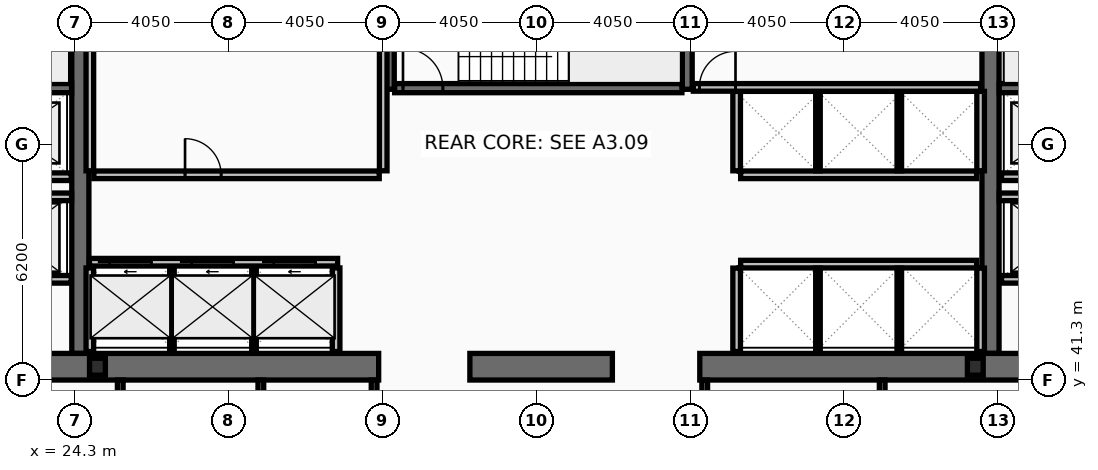
"""IFC4 building model, lengths in metres.
Left out: names, types, materials, properties, quantities, classifications, styles, units other than length and angle.
Written with IfcOpenShell. Run it as: python <this file> out.ifc"""

import sys

from ifc_helpers import new_model, si_unit, direction, frame, frame_2d, origin, origin_2d, place, context, subcontext, project, spatial, rectangle, i_section, extrude, element, fill, save


model = new_model("IFC4")
c1 = context("Model", 3, precision=1e-05, world=origin(), true_north=direction((0.0, 1.0)))
c2 = subcontext(c1, "Body", "Model", "MODEL_VIEW")
j1 = project(units=[si_unit("LENGTHUNIT", "METRE"), si_unit("PLANEANGLEUNIT", "RADIAN")], contexts=[c1])
p1 = place(None, origin())
s1 = spatial("IfcSite", under=j1, at=p1, CompositionType="ELEMENT")
p2 = place(p1, origin())
s2 = spatial("IfcBuilding", under=s1, at=p2, CompositionType="ELEMENT")
p3 = place(p2, frame((0.0, 0.0, 121.8)))
s3 = spatial("IfcBuildingStorey", under=s2, at=p3, CompositionType="ELEMENT", Elevation=121.8)
for number, where, z_axis, x_axis in (
    (1, (24.45, 42.0, 0.0), (0.0, 0.0, 1.0), (0.0, 1.0, 0.0)),
    (2, (48.4, 42.0, 0.0), (0.0, 0.0, 1.0), (0.0, 1.0, 0.0)),
):
    element("IfcWall", number, at=place(p3, frame(where, z_axis=z_axis, x_axis=x_axis)), inside=s3, PredefinedType="SHEAR", context=c2, shape_type="SweptSolid", body=[
        extrude(rectangle(XDim=11.0, YDim=0.45, at=frame_2d((5.5, 0.0))), origin(), (0.0, 0.0, 1.0), 3.44),
    ])
p4 = place(p3, frame((32.3, 41.65, 0.0), z_axis=(0.0, 0.0, 1.0), x_axis=(-1.0, 0.0, 0.0)))
e3 = element("IfcWall", 3, at=p4, inside=s3, PredefinedType="SHEAR", context=c2, shape_type="SweptSolid", body=[
    extrude(rectangle(XDim=11.45, YDim=0.7, at=frame_2d((5.725, 0.0))), origin(), (0.0, 0.0, 1.0), 3.44),
])
p5 = place(p3, frame((38.45, 41.65, 0.0), z_axis=(0.0, 0.0, 1.0), x_axis=(-1.0, 0.0, 0.0)))
e4 = element("IfcWall", 4, at=p5, inside=s3, PredefinedType="SHEAR", context=c2, shape_type="SweptSolid", body=[
    extrude(rectangle(XDim=3.75, YDim=0.7, at=frame_2d((1.875, 0.0))), origin(), (0.0, 0.0, 1.0), 3.44),
])
p6 = place(p3, frame((52.05, 41.65, 0.0), z_axis=(0.0, 0.0, 1.0), x_axis=(-1.0, 0.0, 0.0)))
e5 = element("IfcWall", 5, at=p6, inside=s3, PredefinedType="SHEAR", context=c2, shape_type="SweptSolid", body=[
    extrude(rectangle(XDim=11.3, YDim=0.7, at=frame_2d((5.65, 0.0))), origin(), (0.0, 0.0, 1.0), 3.44),
])
for number, where, z_axis, x_axis in (
    (6, (32.58, 48.95, 0.0), (0.0, 0.0, 1.0), (0.0, 1.0, 0.0)),
    (7, (40.42, 48.95, 0.0), (0.0, 0.0, 1.0), (0.0, 1.0, 0.0)),
):
    element("IfcWall", number, at=place(p3, frame(where, z_axis=z_axis, x_axis=x_axis)), inside=s3, PredefinedType="SHEAR", context=c2, shape_type="SweptSolid", body=[
        extrude(rectangle(XDim=4.05, YDim=0.26, at=frame_2d((2.025, 0.0))), origin(), (0.0, 0.0, 1.0), 3.44),
    ])
p7 = place(p3, frame((16.9, 48.98, 0.0), z_axis=(0.0, 0.0, 1.0), x_axis=(1.0, 0.0, 0.0)))
e8 = element("IfcWall", 8, at=p7, inside=s3, PredefinedType="SHEAR", context=c2, shape_type="SweptSolid", body=[
    extrude(rectangle(XDim=7.32, YDim=0.24, at=frame_2d((3.66, 0.0))), origin(), (0.0, 0.0, 1.0), 3.44),
])
p8 = place(p7, frame((0.22, 0.0, 0.0)))
e9 = element("IfcOpeningElement", 9, at=p8, cuts=e8, PredefinedType="OPENING", context=c2, shape_type="SweptSolid", body=[
    extrude(rectangle(XDim=1.05, YDim=2.15, at=frame_2d((0.525, 1.075))), frame((0.0, 0.13, 0.0), z_axis=(0.0, -1.0, 0.0), x_axis=(1.0, 0.0, 0.0)), (0.0, 0.0, 1.0), 0.26),
])
p9 = place(p3, frame((48.63, 48.98, 0.0), z_axis=(0.0, 0.0, 1.0), x_axis=(1.0, 0.0, 0.0)))
e10 = element("IfcWall", 10, at=p9, inside=s3, PredefinedType="SHEAR", context=c2, shape_type="SweptSolid", body=[
    extrude(rectangle(XDim=7.37, YDim=0.24, at=frame_2d((3.685, 0.0))), origin(), (0.0, 0.0, 1.0), 3.44),
])
p10 = place(p9, frame((6.1, 0.0, 0.0)))
e11 = element("IfcOpeningElement", 11, at=p10, cuts=e10, PredefinedType="OPENING", context=c2, shape_type="SweptSolid", body=[
    extrude(rectangle(XDim=1.05, YDim=2.15, at=frame_2d((0.525, 1.075))), frame((0.0, 0.13, 0.0), z_axis=(0.0, -1.0, 0.0), x_axis=(1.0, 0.0, 0.0)), (0.0, 0.0, 1.0), 0.26),
])
p11 = place(p3, frame((32.72, 48.98, 0.0), z_axis=(0.0, 0.0, 1.0), x_axis=(1.0, 0.0, 0.0)))
e12 = element("IfcWall", 12, at=p11, inside=s3, PredefinedType="SHEAR", context=c2, shape_type="SweptSolid", body=[
    extrude(rectangle(XDim=7.56, YDim=0.24, at=frame_2d((3.78, 0.0))), origin(), (0.0, 0.0, 1.0), 3.44),
])
p12 = place(p11, frame((0.22, 0.0, 0.0)))
e13 = element("IfcOpeningElement", 13, at=p12, cuts=e12, PredefinedType="OPENING", context=c2, shape_type="SweptSolid", body=[
    extrude(rectangle(XDim=1.05, YDim=2.15, at=frame_2d((0.525, 1.075))), frame((0.0, 0.13, 0.0), z_axis=(0.0, -1.0, 0.0), x_axis=(1.0, 0.0, 0.0)), (0.0, 0.0, 1.0), 0.26),
])
for number, where, z_axis, x_axis in (
    (14, (24.9, 41.65, 0.0), (0.0, 0.0, 1.0), (1.0, 0.0, 0.0)),
    (15, (48.0, 41.65, 0.0), (0.0, 0.0, 1.0), (1.0, 0.0, 0.0)),
):
    element("IfcColumn", number, at=place(p3, frame(where, z_axis=z_axis, x_axis=x_axis)), inside=s3, PredefinedType="COLUMN", context=c2, shape_type="SweptSolid", body=[
        extrude(i_section(OverallWidth=0.416, OverallDepth=0.446, WebThickness=0.039, FlangeThickness=0.063, at=origin_2d()), origin(), (0.0, 0.0, 1.0), 3.6),
    ])
p13 = place(p3, frame((24.69, 44.4, 0.0), z_axis=(0.0, 0.0, 1.0), x_axis=(1.0, 0.0, 0.0)))
e16 = element("IfcWall", 16, at=p13, inside=s3, PredefinedType="PARTITIONING", context=c2, shape_type="SweptSolid", body=[
    extrude(rectangle(XDim=6.53, YDim=0.2, at=frame_2d((3.265, 0.0))), origin(), (0.0, 0.0, 1.0), 3.44),
])
p14 = place(p13, frame((0.53, 0.0, 0.0)))
e17 = element("IfcOpeningElement", 17, at=p14, cuts=e16, PredefinedType="OPENING", context=c2, shape_type="SweptSolid", body=[
    extrude(rectangle(XDim=1.1, YDim=2.18, at=frame_2d((0.55, 1.09))), frame((0.0, 0.11, 0.0), z_axis=(0.0, -1.0, 0.0), x_axis=(1.0, 0.0, 0.0)), (0.0, 0.0, 1.0), 0.22),
])
p15 = place(p13, frame((2.69, 0.0, 0.0)))
e18 = element("IfcOpeningElement", 18, at=p15, cuts=e16, PredefinedType="OPENING", context=c2, shape_type="SweptSolid", body=[
    extrude(rectangle(XDim=1.1, YDim=2.18, at=frame_2d((0.55, 1.09))), frame((0.0, 0.11, 0.0), z_axis=(0.0, -1.0, 0.0), x_axis=(1.0, 0.0, 0.0)), (0.0, 0.0, 1.0), 0.22),
])
p16 = place(p13, frame((4.85, 0.0, 0.0)))
e19 = element("IfcOpeningElement", 19, at=p16, cuts=e16, PredefinedType="OPENING", context=c2, shape_type="SweptSolid", body=[
    extrude(rectangle(XDim=1.1, YDim=2.18, at=frame_2d((0.55, 1.09))), frame((0.0, 0.11, 0.0), z_axis=(0.0, -1.0, 0.0), x_axis=(1.0, 0.0, 0.0)), (0.0, 0.0, 1.0), 0.22),
])
p17 = place(p3, frame((51.61, 43.95, 0.0), z_axis=(0.0, 0.0, 1.0), x_axis=(-1.0, 0.0, 0.0)))
e20 = element("IfcWall", 20, at=p17, inside=s3, PredefinedType="PARTITIONING", context=c2, shape_type="SweptSolid", body=[
    extrude(rectangle(XDim=2.92, YDim=0.2, at=frame_2d((1.46, 0.0))), origin(), (0.0, 0.0, 1.0), 3.44),
])
p18 = place(p17, frame((0.81, 0.0, 0.0)))
e21 = element("IfcOpeningElement", 21, at=p18, cuts=e20, PredefinedType="OPENING", context=c2, shape_type="SweptSolid", body=[
    extrude(rectangle(XDim=1.3, YDim=2.18, at=frame_2d((0.65, 1.09))), frame((0.0, 0.11, 0.0), z_axis=(0.0, -1.0, 0.0), x_axis=(1.0, 0.0, 0.0)), (0.0, 0.0, 1.0), 0.22),
])
p19 = place(p3, frame((24.21, 43.95, 0.0), z_axis=(0.0, 0.0, 1.0), x_axis=(-1.0, 0.0, 0.0)))
e22 = element("IfcWall", 22, at=p19, inside=s3, PredefinedType="PARTITIONING", context=c2, shape_type="SweptSolid", body=[
    extrude(rectangle(XDim=2.97, YDim=0.2, at=frame_2d((1.485, 0.0))), origin(), (0.0, 0.0, 1.0), 3.44),
])
p20 = place(p19, frame((0.86, 0.0, 0.0)))
e23 = element("IfcOpeningElement", 23, at=p20, cuts=e22, PredefinedType="OPENING", context=c2, shape_type="SweptSolid", body=[
    extrude(rectangle(XDim=1.3, YDim=2.18, at=frame_2d((0.65, 1.09))), frame((0.0, 0.11, 0.0), z_axis=(0.0, -1.0, 0.0), x_axis=(1.0, 0.0, 0.0)), (0.0, 0.0, 1.0), 0.22),
])
p21 = place(p3, frame((51.61, 46.65, 0.0), z_axis=(0.0, 0.0, 1.0), x_axis=(-1.0, 0.0, 0.0)))
e24 = element("IfcWall", 24, at=p21, inside=s3, PredefinedType="PARTITIONING", context=c2, shape_type="SweptSolid", body=[
    extrude(rectangle(XDim=2.92, YDim=0.2, at=frame_2d((1.46, 0.0))), origin(), (0.0, 0.0, 1.0), 3.44),
])
p22 = place(p21, frame((0.86, 0.0, 0.0)))
e25 = element("IfcOpeningElement", 25, at=p22, cuts=e24, PredefinedType="OPENING", context=c2, shape_type="SweptSolid", body=[
    extrude(rectangle(XDim=1.2, YDim=2.18, at=frame_2d((0.6, 1.09))), frame((0.0, 0.11, 0.0), z_axis=(0.0, -1.0, 0.0), x_axis=(1.0, 0.0, 0.0)), (0.0, 0.0, 1.0), 0.22),
])
p23 = place(p3, frame((24.21, 46.65, 0.0), z_axis=(0.0, 0.0, 1.0), x_axis=(-1.0, 0.0, 0.0)))
e26 = element("IfcWall", 26, at=p23, inside=s3, PredefinedType="PARTITIONING", context=c2, shape_type="SweptSolid", body=[
    extrude(rectangle(XDim=2.97, YDim=0.2, at=frame_2d((1.485, 0.0))), origin(), (0.0, 0.0, 1.0), 3.44),
])
p24 = place(p23, frame((0.91, 0.0, 0.0)))
e27 = element("IfcOpeningElement", 27, at=p24, cuts=e26, PredefinedType="OPENING", context=c2, shape_type="SweptSolid", body=[
    extrude(rectangle(XDim=1.2, YDim=2.18, at=frame_2d((0.6, 1.09))), frame((0.0, 0.11, 0.0), z_axis=(0.0, -1.0, 0.0), x_axis=(1.0, 0.0, 0.0)), (0.0, 0.0, 1.0), 0.22),
])
p25 = place(p3, frame((21.2, 46.12, 0.0), z_axis=(0.0, 0.0, 1.0), x_axis=(1.0, 0.0, 0.0)))
e28 = element("IfcWall", 28, at=p25, inside=s3, PredefinedType="PARTITIONING", context=c2, shape_type="SweptSolid", body=[
    extrude(rectangle(XDim=3.02, YDim=0.2, at=frame_2d((1.51, 0.0))), origin(), (0.0, 0.0, 1.0), 3.44),
])
p26 = place(p3, frame((48.63, 46.12, 0.0), z_axis=(0.0, 0.0, 1.0), x_axis=(1.0, 0.0, 0.0)))
e29 = element("IfcWall", 29, at=p26, inside=s3, PredefinedType="PARTITIONING", context=c2, shape_type="SweptSolid", body=[
    extrude(rectangle(XDim=3.07, YDim=0.2, at=frame_2d((1.535, 0.0))), origin(), (0.0, 0.0, 1.0), 3.44),
])
for number, where, z_axis, x_axis in (
    (30, (24.7, 46.805, 0.0), (0.0, 0.0, 1.0), (0.0, 1.0, 0.0)),
    (31, (32.42, 46.805, 0.0), (0.0, 0.0, 1.0), (0.0, 1.0, 0.0)),
):
    element("IfcWall", number, at=place(p3, frame(where, z_axis=z_axis, x_axis=x_axis)), inside=s3, PredefinedType="PARTITIONING", context=c2, shape_type="SweptSolid", body=[
        extrude(rectangle(XDim=5.99, YDim=0.2, at=frame_2d((2.995, 0.0))), origin(), (0.0, 0.0, 1.0), 3.44),
    ])
p27 = place(p3, frame((24.805, 46.7, 0.0), z_axis=(0.0, 0.0, 1.0), x_axis=(1.0, 0.0, 0.0)))
e32 = element("IfcWall", 32, at=p27, inside=s3, PredefinedType="PARTITIONING", context=c2, shape_type="SweptSolid", body=[
    extrude(rectangle(XDim=7.51, YDim=0.2, at=frame_2d((3.755, 0.0))), origin(), (0.0, 0.0, 1.0), 3.44),
])
p28 = place(p27, frame((2.4, 0.0, 0.0)))
e33 = element("IfcOpeningElement", 33, at=p28, cuts=e32, PredefinedType="OPENING", context=c2, shape_type="SweptSolid", body=[
    extrude(rectangle(XDim=0.95, YDim=2.1, at=frame_2d((0.475, 1.05))), frame((0.0, 0.11, 0.0), z_axis=(0.0, -1.0, 0.0), x_axis=(1.0, 0.0, 0.0)), (0.0, 0.0, 1.0), 0.22),
])
for number, where, z_axis, x_axis in (
    (34, (24.7, 42.05, 0.0), (0.0, 0.0, 1.0), (0.0, 1.0, 0.0)),
    (35, (31.18, 42.05, 0.0), (0.0, 0.0, 1.0), (0.0, 1.0, 0.0)),
):
    element("IfcWall", number, at=place(p3, frame(where, z_axis=z_axis, x_axis=x_axis)), inside=s3, PredefinedType="PARTITIONING", context=c2, shape_type="SweptSolid", body=[
        extrude(rectangle(XDim=2.2, YDim=0.2, at=frame_2d((1.1, 0.0))), origin(), (0.0, 0.0, 1.0), 3.44),
    ])
for number, where, z_axis, x_axis in (
    (36, (26.86, 42.05, 0.0), (0.0, 0.0, 1.0), (0.0, 1.0, 0.0)),
    (37, (29.02, 42.05, 0.0), (0.0, 0.0, 1.0), (0.0, 1.0, 0.0)),
):
    element("IfcWall", number, at=place(p3, frame(where, z_axis=z_axis, x_axis=x_axis)), inside=s3, PredefinedType="PARTITIONING", context=c2, shape_type="SweptSolid", body=[
        extrude(rectangle(XDim=2.2, YDim=0.12, at=frame_2d((1.1, 0.0))), origin(), (0.0, 0.0, 1.0), 3.44),
    ])
p29 = place(p3, frame((41.825, 46.7, 0.0), z_axis=(0.0, 0.0, 1.0), x_axis=(1.0, 0.0, 0.0)))
e38 = element("IfcWall", 38, at=p29, inside=s3, PredefinedType="PARTITIONING", context=c2, shape_type="SweptSolid", body=[
    extrude(rectangle(XDim=6.21, YDim=0.2, at=frame_2d((3.105, 0.0))), origin(), (0.0, 0.0, 1.0), 3.44),
])
for number, where, z_axis, x_axis in (
    (39, (41.72, 46.805, 0.0), (0.0, 0.0, 1.0), (0.0, 1.0, 0.0)),
    (40, (48.14, 46.805, 0.0), (0.0, 0.0, 1.0), (0.0, 1.0, 0.0)),
):
    element("IfcWall", number, at=place(p3, frame(where, z_axis=z_axis, x_axis=x_axis)), inside=s3, PredefinedType="PARTITIONING", context=c2, shape_type="SweptSolid", body=[
        extrude(rectangle(XDim=2.09, YDim=0.2, at=frame_2d((1.045, 0.0))), origin(), (0.0, 0.0, 1.0), 3.44),
    ])
for number, where, z_axis, x_axis in (
    (41, (43.86, 46.805, 0.0), (0.0, 0.0, 1.0), (0.0, 1.0, 0.0)),
    (42, (46.0, 46.805, 0.0), (0.0, 0.0, 1.0), (0.0, 1.0, 0.0)),
):
    element("IfcWall", number, at=place(p3, frame(where, z_axis=z_axis, x_axis=x_axis)), inside=s3, PredefinedType="PARTITIONING", context=c2, shape_type="SweptSolid", body=[
        extrude(rectangle(XDim=2.09, YDim=0.12, at=frame_2d((1.045, 0.0))), origin(), (0.0, 0.0, 1.0), 3.44),
    ])
p30 = place(p3, frame((41.825, 44.35, 0.0), z_axis=(0.0, 0.0, 1.0), x_axis=(1.0, 0.0, 0.0)))
e43 = element("IfcWall", 43, at=p30, inside=s3, PredefinedType="PARTITIONING", context=c2, shape_type="SweptSolid", body=[
    extrude(rectangle(XDim=6.21, YDim=0.2, at=frame_2d((3.105, 0.0))), origin(), (0.0, 0.0, 1.0), 3.44),
])
for number, where, z_axis, x_axis in (
    (44, (41.72, 42.05, 0.0), (0.0, 0.0, 1.0), (0.0, 1.0, 0.0)),
    (45, (48.14, 42.05, 0.0), (0.0, 0.0, 1.0), (0.0, 1.0, 0.0)),
):
    element("IfcWall", number, at=place(p3, frame(where, z_axis=z_axis, x_axis=x_axis)), inside=s3, PredefinedType="PARTITIONING", context=c2, shape_type="SweptSolid", body=[
        extrude(rectangle(XDim=2.195, YDim=0.2, at=frame_2d((1.098, 0.0))), origin(), (0.0, 0.0, 1.0), 3.44),
    ])
for number, where, z_axis, x_axis in (
    (46, (43.86, 42.05, 0.0), (0.0, 0.0, 1.0), (0.0, 1.0, 0.0)),
    (47, (46.0, 42.05, 0.0), (0.0, 0.0, 1.0), (0.0, 1.0, 0.0)),
):
    element("IfcWall", number, at=place(p3, frame(where, z_axis=z_axis, x_axis=x_axis)), inside=s3, PredefinedType="PARTITIONING", context=c2, shape_type="SweptSolid", body=[
        extrude(rectangle(XDim=2.195, YDim=0.12, at=frame_2d((1.098, 0.0))), origin(), (0.0, 0.0, 1.0), 3.44),
    ])
p31 = place(p3, frame((40.58, 49.0, 0.0), z_axis=(0.0, 0.0, 1.0), x_axis=(1.0, 0.0, 0.0)))
e48 = element("IfcWall", 48, at=p31, inside=s3, PredefinedType="PARTITIONING", context=c2, shape_type="SweptSolid", body=[
    extrude(rectangle(XDim=7.56, YDim=0.2, at=frame_2d((3.78, 0.0))), origin(), (0.0, 0.0, 1.0), 3.44),
])
p32 = place(p31, frame((0.16, 0.0, 0.0)))
e49 = element("IfcOpeningElement", 49, at=p32, cuts=e48, PredefinedType="OPENING", context=c2, shape_type="SweptSolid", body=[
    extrude(rectangle(XDim=0.95, YDim=2.1, at=frame_2d((0.475, 1.05))), frame((0.0, 0.11, 0.0), z_axis=(0.0, -1.0, 0.0), x_axis=(1.0, 0.0, 0.0)), (0.0, 0.0, 1.0), 0.22),
])
for number, where, z_axis, x_axis in (
    (50, (25.5, 38.28, 0.0), (0.0, 0.0, 1.0), (0.0, 1.0, 0.0)),
    (51, (29.2, 38.28, 0.0), (0.0, 0.0, 1.0), (0.0, 1.0, 0.0)),
    (52, (32.18, 38.28, 0.0), (0.0, 0.0, 1.0), (0.0, 1.0, 0.0)),
    (53, (40.88, 38.28, 0.0), (0.0, 0.0, 1.0), (0.0, 1.0, 0.0)),
    (54, (45.55, 38.28, 0.0), (0.0, 0.0, 1.0), (0.0, 1.0, 0.0)),
):
    element("IfcWall", number, at=place(p3, frame(where, z_axis=z_axis, x_axis=x_axis)), inside=s3, PredefinedType="PARTITIONING", context=c2, shape_type="SweptSolid", body=[
        extrude(rectangle(XDim=3.02, YDim=0.15, at=frame_2d((1.51, 0.0))), origin(), (0.0, 0.0, 1.0), 3.44),
    ])
p33 = place(p12, origin())
e55 = element("IfcDoor", 55, at=p33, inside=s3, OperationType="SINGLE_SWING_LEFT", PredefinedType="DOOR", context=c2, shape_type="SweptSolid", body=[
    extrude(rectangle(XDim=1.05, YDim=2.15, at=frame_2d((0.525, 1.075))), frame((0.0, 0.025, 0.0), z_axis=(0.0, -1.0, 0.0), x_axis=(1.0, 0.0, 0.0)), (0.0, 0.0, 1.0), 0.05),
])
fill(e13, e55)
p34 = place(p14, origin())
e56 = element("IfcDoor", 56, at=p34, inside=s3, OperationType="SLIDING_TO_LEFT", PredefinedType="DOOR", context=c2, shape_type="SweptSolid", body=[
    extrude(rectangle(XDim=1.1, YDim=2.18, at=frame_2d((0.55, 1.09))), frame((0.0, 0.025, 0.0), z_axis=(0.0, -1.0, 0.0), x_axis=(1.0, 0.0, 0.0)), (0.0, 0.0, 1.0), 0.05),
])
fill(e17, e56)
p35 = place(p15, origin())
e57 = element("IfcDoor", 57, at=p35, inside=s3, OperationType="SLIDING_TO_LEFT", PredefinedType="DOOR", context=c2, shape_type="SweptSolid", body=[
    extrude(rectangle(XDim=1.1, YDim=2.18, at=frame_2d((0.55, 1.09))), frame((0.0, 0.025, 0.0), z_axis=(0.0, -1.0, 0.0), x_axis=(1.0, 0.0, 0.0)), (0.0, 0.0, 1.0), 0.05),
])
fill(e18, e57)
p36 = place(p16, origin())
e58 = element("IfcDoor", 58, at=p36, inside=s3, OperationType="SLIDING_TO_LEFT", PredefinedType="DOOR", context=c2, shape_type="SweptSolid", body=[
    extrude(rectangle(XDim=1.1, YDim=2.18, at=frame_2d((0.55, 1.09))), frame((0.0, 0.025, 0.0), z_axis=(0.0, -1.0, 0.0), x_axis=(1.0, 0.0, 0.0)), (0.0, 0.0, 1.0), 0.05),
])
fill(e19, e58)
p37 = place(p28, origin())
e59 = element("IfcDoor", 59, at=p37, inside=s3, OperationType="SINGLE_SWING_LEFT", PredefinedType="DOOR", context=c2, shape_type="SweptSolid", body=[
    extrude(rectangle(XDim=0.95, YDim=2.1, at=frame_2d((0.475, 1.05))), frame((0.0, 0.025, 0.0), z_axis=(0.0, -1.0, 0.0), x_axis=(1.0, 0.0, 0.0)), (0.0, 0.0, 1.0), 0.05),
])
fill(e33, e59)
p38 = place(p32, origin())
e60 = element("IfcDoor", 60, at=p38, inside=s3, OperationType="SINGLE_SWING_RIGHT", PredefinedType="DOOR", context=c2, shape_type="SweptSolid", body=[
    extrude(rectangle(XDim=0.95, YDim=2.1, at=frame_2d((0.475, 1.05))), frame((0.0, 0.025, 0.0), z_axis=(0.0, -1.0, 0.0), x_axis=(1.0, 0.0, 0.0)), (0.0, 0.0, 1.0), 0.05),
])
fill(e49, e60)
save(model, sys.argv[1])
